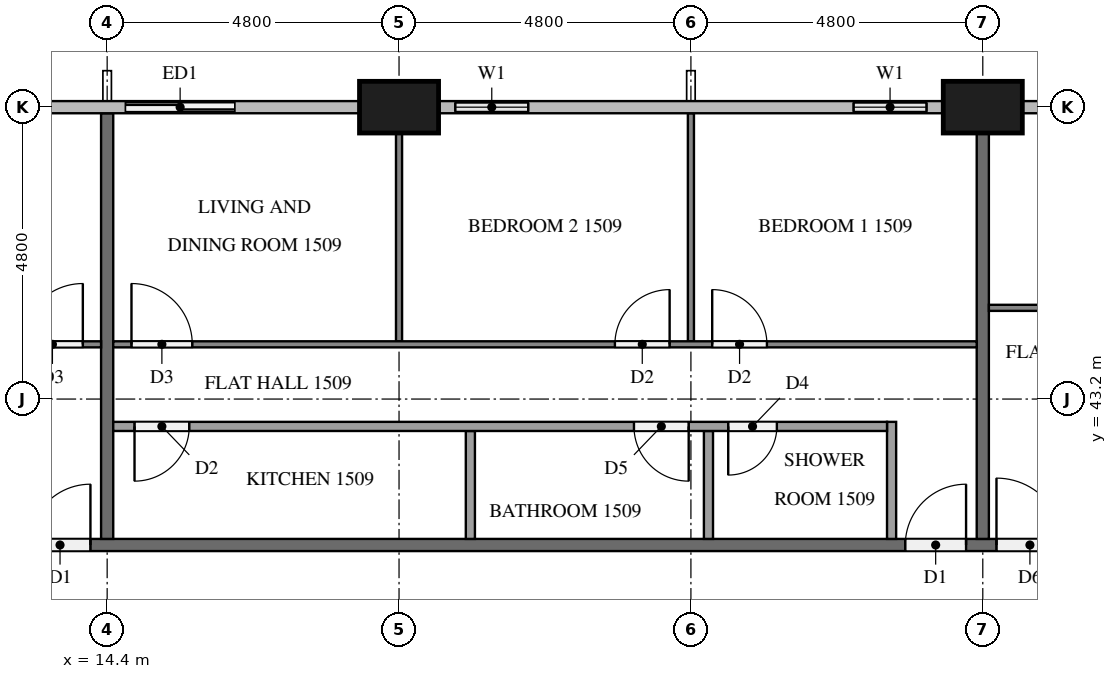
"""IFC4 building model, lengths in metres.
Left out: names, types, materials, properties, quantities, classifications, styles, units other than length and angle.
Written with IfcOpenShell. Run it as: python <this file> out.ifc"""

import sys

from ifc_helpers import new_model, si_unit, direction, frame, frame_2d, origin, origin_2d, place, context, subcontext, project, spatial, rectangle, extrude, element, fill, save


model = new_model("IFC4")
c1 = context("Model", 3, precision=1e-05, world=origin(), true_north=direction((0.0, 1.0)))
c2 = subcontext(c1, "Body", "Model", "MODEL_VIEW")
j1 = project(units=[si_unit("LENGTHUNIT", "METRE"), si_unit("PLANEANGLEUNIT", "RADIAN")], contexts=[c1])
p1 = place(None, origin())
s1 = spatial("IfcSite", under=j1, at=p1, CompositionType="ELEMENT")
p2 = place(p1, origin())
s2 = spatial("IfcBuilding", under=s1, at=p2, CompositionType="ELEMENT")
p3 = place(p2, frame((0.0, 0.0, 62.8)))
s3 = spatial("IfcBuildingStorey", under=s2, at=p3, CompositionType="ELEMENT", Elevation=62.8)
for number, where, z_axis, x_axis in (
    (1, (28.8, 48.0, 0.0), (0.0, 0.0, 1.0), (1.0, 0.0, 0.0)),
    (2, (19.2, 48.0, 0.0), (0.0, 0.0, 1.0), (1.0, 0.0, 0.0)),
):
    element("IfcColumn", number, at=place(p3, frame(where, z_axis=z_axis, x_axis=x_axis)), inside=s3, PredefinedType="COLUMN", context=c2, shape_type="SweptSolid", body=[
        extrude(rectangle(XDim=1.3, YDim=0.85, at=origin_2d()), origin(), (0.0, 0.0, 1.0), 3.2),
    ])
p4 = place(p3, frame((28.15, 48.0, 0.0), z_axis=(0.0, 0.0, 1.0), x_axis=(-1.0, 0.0, 0.0)))
e3 = element("IfcWall", 3, at=p4, inside=s3, PredefinedType="SOLIDWALL", context=c2, shape_type="SweptSolid", body=[
    extrude(rectangle(XDim=1.75, YDim=0.15, at=frame_2d((0.875, 0.0))), origin(), (0.0, 0.0, 1.0), 3.2),
])
p5 = place(p4, frame((0.275, 0.0, 0.9)))
e4 = element("IfcOpeningElement", 4, at=p5, cuts=e3, PredefinedType="OPENING", context=c2, shape_type="SweptSolid", body=[
    extrude(rectangle(XDim=1.2, YDim=1.4, at=frame_2d((0.6, 0.7))), frame((0.0, 0.085, 0.0), z_axis=(0.0, -1.0, 0.0), x_axis=(1.0, 0.0, 0.0)), (0.0, 0.0, 1.0), 0.17),
])
p6 = place(p3, frame((21.6, 48.0, 0.0), z_axis=(0.0, 0.0, 1.0), x_axis=(-1.0, 0.0, 0.0)))
e5 = element("IfcWall", 5, at=p6, inside=s3, PredefinedType="SOLIDWALL", context=c2, shape_type="SweptSolid", body=[
    extrude(rectangle(XDim=1.75, YDim=0.15, at=frame_2d((0.875, 0.0))), origin(), (0.0, 0.0, 1.0), 3.2),
])
p7 = place(p6, frame((0.275, 0.0, 0.9)))
e6 = element("IfcOpeningElement", 6, at=p7, cuts=e5, PredefinedType="OPENING", context=c2, shape_type="SweptSolid", body=[
    extrude(rectangle(XDim=1.2, YDim=1.4, at=frame_2d((0.6, 0.7))), frame((0.0, 0.085, 0.0), z_axis=(0.0, -1.0, 0.0), x_axis=(1.0, 0.0, 0.0)), (0.0, 0.0, 1.0), 0.17),
])
p8 = place(p3, frame((16.8, 48.0, 0.0), z_axis=(0.0, 0.0, 1.0), x_axis=(-1.0, 0.0, 0.0)))
e7 = element("IfcWall", 7, at=p8, inside=s3, PredefinedType="SOLIDWALL", context=c2, shape_type="SweptSolid", body=[
    extrude(rectangle(XDim=2.4, YDim=0.15, at=frame_2d((1.2, 0.0))), origin(), (0.0, 0.0, 1.0), 3.2),
])
p9 = place(p8, frame((0.3, 0.0, 0.0)))
e8 = element("IfcOpeningElement", 8, at=p9, cuts=e7, PredefinedType="OPENING", context=c2, shape_type="SweptSolid", body=[
    extrude(rectangle(XDim=1.8, YDim=2.4, at=frame_2d((0.9, 1.2))), frame((0.0, 0.085, 0.0), z_axis=(0.0, -1.0, 0.0), x_axis=(1.0, 0.0, 0.0)), (0.0, 0.0, 1.0), 0.17),
])
p10 = place(p3, frame((11.9, 40.8, 0.0), z_axis=(0.0, 0.0, 1.0), x_axis=(1.0, 0.0, 0.0)))
e9 = element("IfcWall", 9, at=p10, inside=s3, PredefinedType="PARTITIONING", context=c2, shape_type="SweptSolid", body=[
    extrude(rectangle(XDim=38.6, YDim=0.2, at=frame_2d((19.3, 0.0))), origin(), (0.0, 0.0, 1.0), 3.2),
])
p11 = place(p10, frame((36.375, 0.0, 0.0)))
e10 = element("IfcOpeningElement", 10, at=p11, cuts=e9, PredefinedType="OPENING", context=c2, shape_type="SweptSolid", body=[
    extrude(rectangle(XDim=1.0, YDim=2.1, at=frame_2d((0.5, 1.05))), frame((0.0, 0.11, 0.0), z_axis=(0.0, -1.0, 0.0), x_axis=(1.0, 0.0, 0.0)), (0.0, 0.0, 1.0), 0.22),
])
p12 = place(p10, frame((17.125, 0.0, 0.0)))
e11 = element("IfcOpeningElement", 11, at=p12, cuts=e9, PredefinedType="OPENING", context=c2, shape_type="SweptSolid", body=[
    extrude(rectangle(XDim=1.1, YDim=2.1, at=frame_2d((0.55, 1.05))), frame((0.0, 0.11, 0.0), z_axis=(0.0, -1.0, 0.0), x_axis=(1.0, 0.0, 0.0)), (0.0, 0.0, 1.0), 0.22),
])
p13 = place(p10, frame((15.625, 0.0, 0.0)))
e12 = element("IfcOpeningElement", 12, at=p13, cuts=e9, PredefinedType="OPENING", context=c2, shape_type="SweptSolid", body=[
    extrude(rectangle(XDim=1.0, YDim=2.1, at=frame_2d((0.5, 1.05))), frame((0.0, 0.11, 0.0), z_axis=(0.0, -1.0, 0.0), x_axis=(1.0, 0.0, 0.0)), (0.0, 0.0, 1.0), 0.22),
])
p14 = place(p10, frame((1.225, 0.0, 0.0)))
e13 = element("IfcOpeningElement", 13, at=p14, cuts=e9, PredefinedType="OPENING", context=c2, shape_type="SweptSolid", body=[
    extrude(rectangle(XDim=1.0, YDim=2.1, at=frame_2d((0.5, 1.05))), frame((0.0, 0.11, 0.0), z_axis=(0.0, -1.0, 0.0), x_axis=(1.0, 0.0, 0.0)), (0.0, 0.0, 1.0), 0.22),
])
p15 = place(p3, frame((28.8, 47.575, 0.0), z_axis=(0.0, 0.0, 1.0), x_axis=(0.0, -1.0, 0.0)))
e14 = element("IfcWall", 14, at=p15, inside=s3, PredefinedType="PARTITIONING", context=c2, shape_type="SweptSolid", body=[
    extrude(rectangle(XDim=6.675, YDim=0.2, at=frame_2d((3.337, 0.0))), origin(), (0.0, 0.0, 1.0), 3.2),
])
p16 = place(p3, frame((14.4, 47.9, 0.0), z_axis=(0.0, 0.0, 1.0), x_axis=(0.0, -1.0, 0.0)))
e15 = element("IfcWall", 15, at=p16, inside=s3, PredefinedType="PARTITIONING", context=c2, shape_type="SweptSolid", body=[
    extrude(rectangle(XDim=7.0, YDim=0.2, at=frame_2d((3.5, 0.0))), origin(), (0.0, 0.0, 1.0), 3.2),
])
p17 = place(p3, frame((28.9, 44.7, 0.0), z_axis=(0.0, 0.0, 1.0), x_axis=(1.0, 0.0, 0.0)))
e16 = element("IfcWall", 16, at=p17, inside=s3, PredefinedType="PARTITIONING", context=c2, shape_type="SweptSolid", body=[
    extrude(rectangle(XDim=19.0, YDim=0.1, at=frame_2d((9.5, 0.0))), origin(), (0.0, 0.0, 1.0), 3.2),
])
p18 = place(p17, frame((3.35, 0.0, 0.0)))
e17 = element("IfcOpeningElement", 17, at=p18, cuts=e16, PredefinedType="OPENING", context=c2, shape_type="SweptSolid", body=[
    extrude(rectangle(XDim=1.0, YDim=2.1, at=frame_2d((0.5, 1.05))), frame((0.0, 0.06, 0.0), z_axis=(0.0, -1.0, 0.0), x_axis=(1.0, 0.0, 0.0)), (0.0, 0.0, 1.0), 0.12),
])
p19 = place(p17, frame((5.05, 0.0, 0.0)))
e18 = element("IfcOpeningElement", 18, at=p19, cuts=e16, PredefinedType="OPENING", context=c2, shape_type="SweptSolid", body=[
    extrude(rectangle(XDim=0.9, YDim=2.1, at=frame_2d((0.45, 1.05))), frame((0.0, 0.06, 0.0), z_axis=(0.0, -1.0, 0.0), x_axis=(1.0, 0.0, 0.0)), (0.0, 0.0, 1.0), 0.12),
])
p20 = place(p17, frame((13.05, 0.0, 0.0)))
e19 = element("IfcOpeningElement", 19, at=p20, cuts=e16, PredefinedType="OPENING", context=c2, shape_type="SweptSolid", body=[
    extrude(rectangle(XDim=0.9, YDim=2.1, at=frame_2d((0.45, 1.05))), frame((0.0, 0.06, 0.0), z_axis=(0.0, -1.0, 0.0), x_axis=(1.0, 0.0, 0.0)), (0.0, 0.0, 1.0), 0.12),
])
p21 = place(p17, frame((14.65, 0.0, 0.0)))
e20 = element("IfcOpeningElement", 20, at=p21, cuts=e16, PredefinedType="OPENING", context=c2, shape_type="SweptSolid", body=[
    extrude(rectangle(XDim=0.9, YDim=2.1, at=frame_2d((0.45, 1.05))), frame((0.0, 0.06, 0.0), z_axis=(0.0, -1.0, 0.0), x_axis=(1.0, 0.0, 0.0)), (0.0, 0.0, 1.0), 0.12),
])
p22 = place(p3, frame((24.0, 44.15, 0.0), z_axis=(0.0, 0.0, 1.0), x_axis=(0.0, 1.0, 0.0)))
e21 = element("IfcWall", 21, at=p22, inside=s3, PredefinedType="PARTITIONING", context=c2, shape_type="SweptSolid", body=[
    extrude(rectangle(XDim=3.75, YDim=0.1, at=frame_2d((1.875, 0.0))), origin(), (0.0, 0.0, 1.0), 3.2),
])
p23 = place(p3, frame((19.2, 44.15, 0.0), z_axis=(0.0, 0.0, 1.0), x_axis=(0.0, 1.0, 0.0)))
e22 = element("IfcWall", 22, at=p23, inside=s3, PredefinedType="PARTITIONING", context=c2, shape_type="SweptSolid", body=[
    extrude(rectangle(XDim=3.425, YDim=0.1, at=frame_2d((1.712, 0.0))), origin(), (0.0, 0.0, 1.0), 3.2),
])
p24 = place(p3, frame((14.5, 44.1, 0.0), z_axis=(0.0, 0.0, 1.0), x_axis=(1.0, 0.0, 0.0)))
e23 = element("IfcWall", 23, at=p24, inside=s3, PredefinedType="PARTITIONING", context=c2, shape_type="SweptSolid", body=[
    extrude(rectangle(XDim=14.2, YDim=0.1, at=frame_2d((7.1, 0.0))), origin(), (0.0, 0.0, 1.0), 3.2),
])
p25 = place(p24, frame((9.85, 0.0, 0.0)))
e24 = element("IfcOpeningElement", 24, at=p25, cuts=e23, PredefinedType="OPENING", context=c2, shape_type="SweptSolid", body=[
    extrude(rectangle(XDim=0.9, YDim=2.1, at=frame_2d((0.45, 1.05))), frame((0.0, 0.06, 0.0), z_axis=(0.0, -1.0, 0.0), x_axis=(1.0, 0.0, 0.0)), (0.0, 0.0, 1.0), 0.12),
])
p26 = place(p24, frame((8.25, 0.0, 0.0)))
e25 = element("IfcOpeningElement", 25, at=p26, cuts=e23, PredefinedType="OPENING", context=c2, shape_type="SweptSolid", body=[
    extrude(rectangle(XDim=0.9, YDim=2.1, at=frame_2d((0.45, 1.05))), frame((0.0, 0.06, 0.0), z_axis=(0.0, -1.0, 0.0), x_axis=(1.0, 0.0, 0.0)), (0.0, 0.0, 1.0), 0.12),
])
p27 = place(p24, frame((0.3, 0.0, 0.0)))
e26 = element("IfcOpeningElement", 26, at=p27, cuts=e23, PredefinedType="OPENING", context=c2, shape_type="SweptSolid", body=[
    extrude(rectangle(XDim=1.0, YDim=2.1, at=frame_2d((0.5, 1.05))), frame((0.0, 0.06, 0.0), z_axis=(0.0, -1.0, 0.0), x_axis=(1.0, 0.0, 0.0)), (0.0, 0.0, 1.0), 0.12),
])
for number, where, z_axis, x_axis in (
    (27, (24.289, 40.9, 0.0), (0.0, 0.0, 1.0), (0.0, 1.0, 0.0)),
    (28, (20.373, 40.9, 0.0), (0.0, 0.0, 1.0), (0.0, 1.0, 0.0)),
):
    element("IfcWall", number, at=place(p3, frame(where, z_axis=z_axis, x_axis=x_axis)), inside=s3, PredefinedType="PARTITIONING", context=c2, shape_type="SweptSolid", body=[
        extrude(rectangle(XDim=1.775, YDim=0.15, at=frame_2d((0.888, 0.0))), origin(), (0.0, 0.0, 1.0), 3.2),
    ])
p28 = place(p3, frame((27.3, 40.9, 0.0), z_axis=(0.0, 0.0, 1.0), x_axis=(0.0, 1.0, 0.0)))
e29 = element("IfcWall", 29, at=p28, inside=s3, PredefinedType="PARTITIONING", context=c2, shape_type="SweptSolid", body=[
    extrude(rectangle(XDim=1.925, YDim=0.15, at=frame_2d((0.962, 0.0))), origin(), (0.0, 0.0, 1.0), 3.2),
])
p29 = place(p3, frame((27.225, 42.75, 0.0), z_axis=(0.0, 0.0, 1.0), x_axis=(-1.0, 0.0, 0.0)))
e30 = element("IfcWall", 30, at=p29, inside=s3, PredefinedType="PARTITIONING", context=c2, shape_type="SweptSolid", body=[
    extrude(rectangle(XDim=12.725, YDim=0.15, at=frame_2d((6.363, 0.0))), origin(), (0.0, 0.0, 1.0), 3.2),
])
p30 = place(p29, frame((1.812, 0.0, 0.0)))
e31 = element("IfcOpeningElement", 31, at=p30, cuts=e30, PredefinedType="OPENING", context=c2, shape_type="SweptSolid", body=[
    extrude(rectangle(XDim=0.8, YDim=2.1, at=frame_2d((0.4, 1.05))), frame((0.0, 0.085, 0.0), z_axis=(0.0, -1.0, 0.0), x_axis=(1.0, 0.0, 0.0)), (0.0, 0.0, 1.0), 0.17),
])
p31 = place(p29, frame((3.261, 0.0, 0.0)))
e32 = element("IfcOpeningElement", 32, at=p31, cuts=e30, PredefinedType="OPENING", context=c2, shape_type="SweptSolid", body=[
    extrude(rectangle(XDim=0.9, YDim=2.1, at=frame_2d((0.45, 1.05))), frame((0.0, 0.085, 0.0), z_axis=(0.0, -1.0, 0.0), x_axis=(1.0, 0.0, 0.0)), (0.0, 0.0, 1.0), 0.17),
])
p32 = place(p29, frame((11.475, 0.0, 0.0)))
e33 = element("IfcOpeningElement", 33, at=p32, cuts=e30, PredefinedType="OPENING", context=c2, shape_type="SweptSolid", body=[
    extrude(rectangle(XDim=0.9, YDim=2.1, at=frame_2d((0.45, 1.05))), frame((0.0, 0.085, 0.0), z_axis=(0.0, -1.0, 0.0), x_axis=(1.0, 0.0, 0.0)), (0.0, 0.0, 1.0), 0.17),
])
p33 = place(p3, frame((5.141, 44.1, 0.0), z_axis=(0.0, 0.0, 1.0), x_axis=(1.0, 0.0, 0.0)))
e34 = element("IfcWall", 34, at=p33, inside=s3, PredefinedType="PARTITIONING", context=c2, shape_type="SweptSolid", body=[
    extrude(rectangle(XDim=9.159, YDim=0.1, at=frame_2d((4.58, 0.0))), origin(), (0.0, 0.0, 1.0), 3.2),
])
p34 = place(p33, frame((7.859, 0.0, 0.0)))
e35 = element("IfcOpeningElement", 35, at=p34, cuts=e34, PredefinedType="OPENING", context=c2, shape_type="SweptSolid", body=[
    extrude(rectangle(XDim=1.0, YDim=2.1, at=frame_2d((0.5, 1.05))), frame((0.0, 0.06, 0.0), z_axis=(0.0, -1.0, 0.0), x_axis=(1.0, 0.0, 0.0)), (0.0, 0.0, 1.0), 0.12),
])
p35 = place(p33, frame((0.3, 0.0, 0.0)))
e36 = element("IfcOpeningElement", 36, at=p35, cuts=e34, PredefinedType="OPENING", context=c2, shape_type="SweptSolid", body=[
    extrude(rectangle(XDim=0.9, YDim=2.1, at=frame_2d((0.45, 1.05))), frame((0.0, 0.06, 0.0), z_axis=(0.0, -1.0, 0.0), x_axis=(1.0, 0.0, 0.0)), (0.0, 0.0, 1.0), 0.12),
])
p36 = place(p5, origin())
e37 = element("IfcWindow", 37, at=p36, inside=s3, PartitioningType="SINGLE_PANEL", PredefinedType="WINDOW", context=c2, shape_type="SweptSolid", body=[
    extrude(rectangle(XDim=1.2, YDim=1.4, at=frame_2d((0.6, 0.7))), frame((0.0, 0.03, 0.0), z_axis=(0.0, -1.0, 0.0), x_axis=(1.0, 0.0, 0.0)), (0.0, 0.0, 1.0), 0.06),
])
fill(e4, e37)
p37 = place(p7, origin())
e38 = element("IfcWindow", 38, at=p37, inside=s3, PartitioningType="SINGLE_PANEL", PredefinedType="WINDOW", context=c2, shape_type="SweptSolid", body=[
    extrude(rectangle(XDim=1.2, YDim=1.4, at=frame_2d((0.6, 0.7))), frame((0.0, 0.03, 0.0), z_axis=(0.0, -1.0, 0.0), x_axis=(1.0, 0.0, 0.0)), (0.0, 0.0, 1.0), 0.06),
])
fill(e6, e38)
p38 = place(p9, origin())
e39 = element("IfcDoor", 39, at=p38, inside=s3, OperationType="SLIDING_TO_LEFT", PredefinedType="DOOR", context=c2, shape_type="SweptSolid", body=[
    extrude(rectangle(XDim=1.8, YDim=2.4, at=frame_2d((0.9, 1.2))), frame((0.0, 0.025, 0.0), z_axis=(0.0, -1.0, 0.0), x_axis=(1.0, 0.0, 0.0)), (0.0, 0.0, 1.0), 0.05),
])
fill(e8, e39)
p39 = place(p12, origin())
e40 = element("IfcDoor", 40, at=p39, inside=s3, OperationType="SINGLE_SWING_LEFT", PredefinedType="DOOR", context=c2, shape_type="SweptSolid", body=[
    extrude(rectangle(XDim=1.1, YDim=2.1, at=frame_2d((0.55, 1.05))), frame((0.0, 0.025, 0.0), z_axis=(0.0, -1.0, 0.0), x_axis=(1.0, 0.0, 0.0)), (0.0, 0.0, 1.0), 0.05),
])
fill(e11, e40)
p40 = place(p13, origin())
e41 = element("IfcDoor", 41, at=p40, inside=s3, OperationType="SINGLE_SWING_RIGHT", PredefinedType="DOOR", context=c2, shape_type="SweptSolid", body=[
    extrude(rectangle(XDim=1.0, YDim=2.1, at=frame_2d((0.5, 1.05))), frame((0.0, 0.025, 0.0), z_axis=(0.0, -1.0, 0.0), x_axis=(1.0, 0.0, 0.0)), (0.0, 0.0, 1.0), 0.05),
])
fill(e12, e41)
p41 = place(p14, origin())
e42 = element("IfcDoor", 42, at=p41, inside=s3, OperationType="SINGLE_SWING_RIGHT", PredefinedType="DOOR", context=c2, shape_type="SweptSolid", body=[
    extrude(rectangle(XDim=1.0, YDim=2.1, at=frame_2d((0.5, 1.05))), frame((0.0, 0.025, 0.0), z_axis=(0.0, -1.0, 0.0), x_axis=(1.0, 0.0, 0.0)), (0.0, 0.0, 1.0), 0.05),
])
fill(e13, e42)
p42 = place(p25, origin())
e43 = element("IfcDoor", 43, at=p42, inside=s3, OperationType="SINGLE_SWING_LEFT", PredefinedType="DOOR", context=c2, shape_type="SweptSolid", body=[
    extrude(rectangle(XDim=0.9, YDim=2.1, at=frame_2d((0.45, 1.05))), frame((0.0, 0.025, 0.0), z_axis=(0.0, -1.0, 0.0), x_axis=(1.0, 0.0, 0.0)), (0.0, 0.0, 1.0), 0.05),
])
fill(e24, e43)
p43 = place(p26, origin())
e44 = element("IfcDoor", 44, at=p43, inside=s3, OperationType="SINGLE_SWING_RIGHT", PredefinedType="DOOR", context=c2, shape_type="SweptSolid", body=[
    extrude(rectangle(XDim=0.9, YDim=2.1, at=frame_2d((0.45, 1.05))), frame((0.0, 0.025, 0.0), z_axis=(0.0, -1.0, 0.0), x_axis=(1.0, 0.0, 0.0)), (0.0, 0.0, 1.0), 0.05),
])
fill(e25, e44)
p44 = place(p27, origin())
e45 = element("IfcDoor", 45, at=p44, inside=s3, OperationType="SINGLE_SWING_LEFT", PredefinedType="DOOR", context=c2, shape_type="SweptSolid", body=[
    extrude(rectangle(XDim=1.0, YDim=2.1, at=frame_2d((0.5, 1.05))), frame((0.0, 0.025, 0.0), z_axis=(0.0, -1.0, 0.0), x_axis=(1.0, 0.0, 0.0)), (0.0, 0.0, 1.0), 0.05),
])
fill(e26, e45)
p45 = place(p30, origin())
e46 = element("IfcDoor", 46, at=p45, inside=s3, OperationType="SINGLE_SWING_RIGHT", PredefinedType="DOOR", context=c2, shape_type="SweptSolid", body=[
    extrude(rectangle(XDim=0.8, YDim=2.1, at=frame_2d((0.4, 1.05))), frame((0.0, 0.025, 0.0), z_axis=(0.0, -1.0, 0.0), x_axis=(1.0, 0.0, 0.0)), (0.0, 0.0, 1.0), 0.05),
])
fill(e31, e46)
p46 = place(p31, origin())
e47 = element("IfcDoor", 47, at=p46, inside=s3, OperationType="SINGLE_SWING_LEFT", PredefinedType="DOOR", context=c2, shape_type="SweptSolid", body=[
    extrude(rectangle(XDim=0.9, YDim=2.1, at=frame_2d((0.45, 1.05))), frame((0.0, 0.025, 0.0), z_axis=(0.0, -1.0, 0.0), x_axis=(1.0, 0.0, 0.0)), (0.0, 0.0, 1.0), 0.05),
])
fill(e32, e47)
p47 = place(p32, origin())
e48 = element("IfcDoor", 48, at=p47, inside=s3, OperationType="SINGLE_SWING_RIGHT", PredefinedType="DOOR", context=c2, shape_type="SweptSolid", body=[
    extrude(rectangle(XDim=0.9, YDim=2.1, at=frame_2d((0.45, 1.05))), frame((0.0, 0.025, 0.0), z_axis=(0.0, -1.0, 0.0), x_axis=(1.0, 0.0, 0.0)), (0.0, 0.0, 1.0), 0.05),
])
fill(e33, e48)
p48 = place(p34, origin())
e49 = element("IfcDoor", 49, at=p48, inside=s3, OperationType="SINGLE_SWING_RIGHT", PredefinedType="DOOR", context=c2, shape_type="SweptSolid", body=[
    extrude(rectangle(XDim=1.0, YDim=2.1, at=frame_2d((0.5, 1.05))), frame((0.0, 0.025, 0.0), z_axis=(0.0, -1.0, 0.0), x_axis=(1.0, 0.0, 0.0)), (0.0, 0.0, 1.0), 0.05),
])
fill(e35, e49)
save(model, sys.argv[1])
